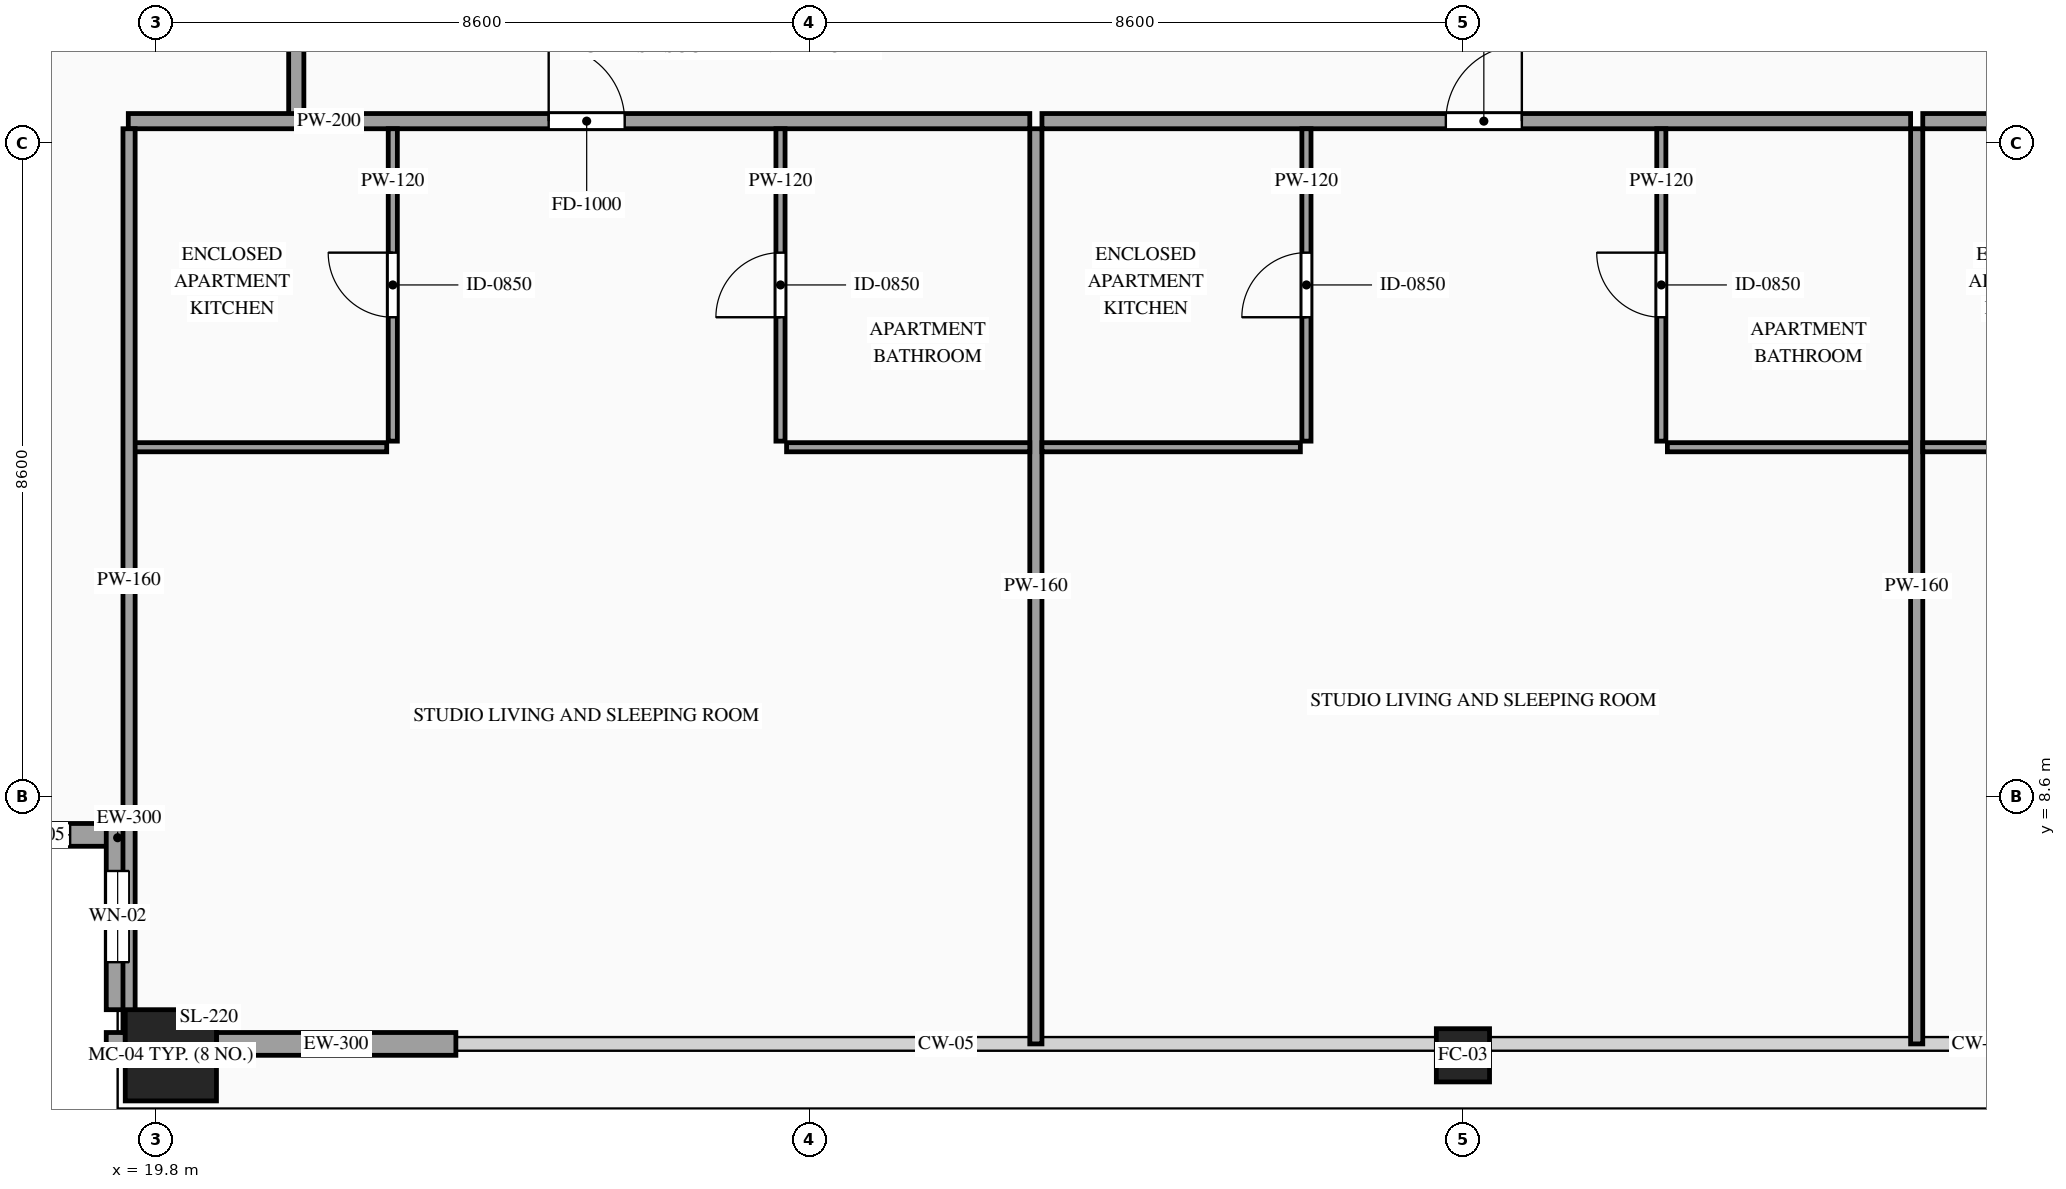
"""IFC4 building model, lengths in metres.
Left out: names, types, materials, properties, quantities, classifications, styles, units other than length and angle.
Written with IfcOpenShell. Run it as: python <this file> out.ifc"""

import sys

from ifc_helpers import new_model, si_unit, direction, frame, frame_2d, origin, origin_2d, place, context, subcontext, project, spatial, rectangle, hollow_rectangle, extrude, source, transform, mapped, element, fill, save


model = new_model("IFC4")
c1 = context("Model", 3, precision=1e-05, world=origin(), true_north=direction((0.0, 1.0)))
c2 = subcontext(c1, "Body", "Model", "MODEL_VIEW")
j1 = project(units=[si_unit("LENGTHUNIT", "METRE"), si_unit("PLANEANGLEUNIT", "RADIAN")], contexts=[c1])
p1 = place(None, origin())
s1 = spatial("IfcSite", under=j1, at=p1, CompositionType="ELEMENT")
p2 = place(p1, origin())
s2 = spatial("IfcBuilding", under=s1, at=p2, CompositionType="ELEMENT")
p3 = place(p2, frame((0.0, 0.0, 275.1)))
s3 = spatial("IfcBuildingStorey", under=s2, at=p3, CompositionType="ELEMENT", Elevation=275.1)
m1 = source(origin(), c2, "Body", "SweptSolid", [
    extrude(hollow_rectangle(XDim=1.2, YDim=1.2, WallThickness=0.055, at=origin_2d()), origin(), (0.0, 0.0, 1.0), 3.5),
])
p4 = place(p3, frame((20.0, 5.2, 0.0), z_axis=(0.0, 0.0, 1.0), x_axis=(1.0, 0.0, 0.0)))
e1 = element("IfcColumn", 1, at=p4, inside=s3, PredefinedType="COLUMN", context=c2, shape_type="MappedRepresentation", body=[
    mapped(m1, transform((0.0, 0.0, 0.0), scale=1.0)),
])
m2 = source(origin(), c2, "Body", "SweptSolid", [
    extrude(hollow_rectangle(XDim=0.7, YDim=0.7, WallThickness=0.032, at=origin_2d()), origin(), (0.0, 0.0, 1.0), 3.5),
])
p5 = place(p3, frame((37.0, 5.2, 0.0), z_axis=(0.0, 0.0, 1.0), x_axis=(1.0, 0.0, 0.0)))
e2 = element("IfcColumn", 2, at=p5, inside=s3, PredefinedType="COLUMN", context=c2, shape_type="MappedRepresentation", body=[
    mapped(m2, transform((0.0, 0.0, 0.0), scale=1.0)),
])
p6 = place(p3, frame((17.0, 8.1, 0.0), z_axis=(0.0, 0.0, 1.0), x_axis=(1.0, 0.0, 0.0)))
e3 = element("IfcWall", 3, at=p6, inside=s3, PredefinedType="SOLIDWALL", context=c2, shape_type="SweptSolid", body=[
    extrude(rectangle(XDim=2.45, YDim=0.3, at=frame_2d((1.225, 0.0))), origin(), (0.0, 0.0, 1.0), 3.28),
])
p7 = place(p6, frame((0.775, 0.0, 0.85)))
e4 = element("IfcOpeningElement", 4, at=p7, cuts=e3, PredefinedType="OPENING", context=c2, shape_type="SweptSolid", body=[
    extrude(rectangle(XDim=0.9, YDim=1.5, at=frame_2d((0.45, 0.75))), frame((0.0, 0.165, 0.0), z_axis=(0.0, -1.0, 0.0), x_axis=(1.0, 0.0, 0.0)), (0.0, 0.0, 1.0), 0.33),
])
p8 = place(p3, frame((19.3, 8.25, 0.0), z_axis=(0.0, 0.0, 1.0), x_axis=(0.0, -1.0, 0.0)))
e5 = element("IfcWall", 5, at=p8, inside=s3, PredefinedType="SOLIDWALL", context=c2, shape_type="SweptSolid", body=[
    extrude(rectangle(XDim=2.45, YDim=0.3, at=frame_2d((1.225, 0.0))), origin(), (0.0, 0.0, 1.0), 3.28),
])
p9 = place(p8, frame((0.625, 0.0, 0.85)))
e6 = element("IfcOpeningElement", 6, at=p9, cuts=e5, PredefinedType="OPENING", context=c2, shape_type="SweptSolid", body=[
    extrude(rectangle(XDim=1.2, YDim=2.1, at=frame_2d((0.6, 1.05))), frame((0.0, 0.165, 0.0), z_axis=(0.0, -1.0, 0.0), x_axis=(1.0, 0.0, 0.0)), (0.0, 0.0, 1.0), 0.33),
])
m3 = source(origin(), c2, "Body", "SweptSolid", [
    extrude(rectangle(XDim=0.25, YDim=0.3, at=frame_2d((0.125, 0.0))), origin(), (0.0, 0.0, 1.0), 3.28),
])
p10 = place(p3, frame((19.15, 5.35, 0.0), z_axis=(0.0, 0.0, 1.0), x_axis=(1.0, 0.0, 0.0)))
e7 = element("IfcWall", 7, at=p10, inside=s3, PredefinedType="SOLIDWALL", context=c2, shape_type="MappedRepresentation", body=[
    mapped(m3, transform((0.0, 0.0, 0.0), scale=1.0)),
])
m4 = source(origin(), c2, "Body", "SweptSolid", [
    extrude(rectangle(XDim=3.15, YDim=0.3, at=frame_2d((1.575, 0.0))), origin(), (0.0, 0.0, 1.0), 2.835),
])
p11 = place(p3, frame((20.6, 5.35, 0.0), z_axis=(0.0, 0.0, 1.0), x_axis=(1.0, 0.0, 0.0)))
e8 = element("IfcWall", 8, at=p11, inside=s3, PredefinedType="SOLIDWALL", context=c2, shape_type="MappedRepresentation", body=[
    mapped(m4, transform((0.0, 0.0, 0.0), scale=1.0)),
])
m5 = source(origin(), c2, "Body", "SweptSolid", [
    extrude(rectangle(XDim=1.7, YDim=0.2, at=frame_2d((0.85, 0.0))), origin(), (0.0, 0.0, 1.0), 3.28),
])
p12 = place(p3, frame((21.65, 17.55, 0.0), z_axis=(0.0, 0.0, 1.0), x_axis=(0.0, 1.0, 0.0)))
e9 = element("IfcWall", 9, at=p12, inside=s3, PredefinedType="PARTITIONING", context=c2, shape_type="MappedRepresentation", body=[
    mapped(m5, transform((0.0, 0.0, 0.0), scale=1.0)),
])
p13 = place(p3, frame((19.44, 17.49, 0.0), z_axis=(0.0, 0.0, 1.0), x_axis=(1.0, 0.0, 0.0)))
e10 = element("IfcWall", 10, at=p13, inside=s3, PredefinedType="PARTITIONING", context=c2, shape_type="SweptSolid", body=[
    extrude(rectangle(XDim=11.861, YDim=0.2, at=frame_2d((5.931, 0.0))), origin(), (0.0, 0.0, 1.0), 3.28),
])
p14 = place(p13, frame((5.531, 0.0, 0.0)))
e11 = element("IfcOpeningElement", 11, at=p14, cuts=e10, PredefinedType="OPENING", context=c2, shape_type="SweptSolid", body=[
    extrude(rectangle(XDim=1.0, YDim=2.2, at=frame_2d((0.5, 1.1))), frame((0.0, 0.115, 0.0), z_axis=(0.0, -1.0, 0.0), x_axis=(1.0, 0.0, 0.0)), (0.0, 0.0, 1.0), 0.23),
])
m6 = source(origin(), c2, "Body", "SweptSolid", [
    extrude(rectangle(XDim=12.04, YDim=0.16, at=frame_2d((6.02, 0.0))), origin(), (0.0, 0.0, 1.0), 3.28),
])
p15 = place(p3, frame((31.381, 5.35, 0.0), z_axis=(0.0, 0.0, 1.0), x_axis=(0.0, 1.0, 0.0)))
e12 = element("IfcWall", 12, at=p15, inside=s3, PredefinedType="PARTITIONING", context=c2, shape_type="MappedRepresentation", body=[
    mapped(m6, transform((0.0, 0.0, 0.0), scale=1.0)),
])
m7 = source(origin(), c2, "Body", "SweptSolid", [
    extrude(rectangle(XDim=3.4, YDim=0.12, at=frame_2d((1.7, 0.0))), origin(), (0.0, 0.0, 1.0), 3.28),
])
p16 = place(p3, frame((19.44, 13.2, 0.0), z_axis=(0.0, 0.0, 1.0), x_axis=(1.0, 0.0, 0.0)))
e13 = element("IfcWall", 13, at=p16, inside=s3, PredefinedType="PARTITIONING", context=c2, shape_type="MappedRepresentation", body=[
    mapped(m7, transform((0.0, 0.0, 0.0), scale=1.0)),
])
p17 = place(p3, frame((22.92, 13.28, 0.0), z_axis=(0.0, 0.0, 1.0), x_axis=(0.0, 1.0, 0.0)))
e14 = element("IfcWall", 14, at=p17, inside=s3, PredefinedType="PARTITIONING", context=c2, shape_type="SweptSolid", body=[
    extrude(rectangle(XDim=4.11, YDim=0.12, at=frame_2d((2.055, 0.0))), origin(), (0.0, 0.0, 1.0), 3.28),
])
p18 = place(p17, frame((1.63, 0.0, 0.0)))
e15 = element("IfcOpeningElement", 15, at=p18, cuts=e14, PredefinedType="OPENING", context=c2, shape_type="SweptSolid", body=[
    extrude(rectangle(XDim=0.85, YDim=2.1, at=frame_2d((0.425, 1.05))), frame((0.0, 0.075, 0.0), z_axis=(0.0, -1.0, 0.0), x_axis=(1.0, 0.0, 0.0)), (0.0, 0.0, 1.0), 0.15),
])
m8 = source(origin(), c2, "Body", "SweptSolid", [
    extrude(rectangle(XDim=3.2, YDim=0.12, at=frame_2d((1.6, 0.0))), origin(), (0.0, 0.0, 1.0), 3.28),
])
p19 = place(p3, frame((28.101, 13.2, 0.0), z_axis=(0.0, 0.0, 1.0), x_axis=(1.0, 0.0, 0.0)))
e16 = element("IfcWall", 16, at=p19, inside=s3, PredefinedType="PARTITIONING", context=c2, shape_type="MappedRepresentation", body=[
    mapped(m8, transform((0.0, 0.0, 0.0), scale=1.0)),
])
p20 = place(p3, frame((28.021, 13.28, 0.0), z_axis=(0.0, 0.0, 1.0), x_axis=(0.0, 1.0, 0.0)))
e17 = element("IfcWall", 17, at=p20, inside=s3, PredefinedType="PARTITIONING", context=c2, shape_type="SweptSolid", body=[
    extrude(rectangle(XDim=4.11, YDim=0.12, at=frame_2d((2.055, 0.0))), origin(), (0.0, 0.0, 1.0), 3.28),
])
p21 = place(p20, frame((1.63, 0.0, 0.0)))
e18 = element("IfcOpeningElement", 18, at=p21, cuts=e17, PredefinedType="OPENING", context=c2, shape_type="SweptSolid", body=[
    extrude(rectangle(XDim=0.85, YDim=2.1, at=frame_2d((0.425, 1.05))), frame((0.0, 0.075, 0.0), z_axis=(0.0, -1.0, 0.0), x_axis=(1.0, 0.0, 0.0)), (0.0, 0.0, 1.0), 0.15),
])
p22 = place(p3, frame((31.461, 17.49, 0.0), z_axis=(0.0, 0.0, 1.0), x_axis=(1.0, 0.0, 0.0)))
e19 = element("IfcWall", 19, at=p22, inside=s3, PredefinedType="PARTITIONING", context=c2, shape_type="SweptSolid", body=[
    extrude(rectangle(XDim=11.429, YDim=0.2, at=frame_2d((5.714, 0.0))), origin(), (0.0, 0.0, 1.0), 3.28),
])
p23 = place(p22, frame((5.314, 0.0, 0.0)))
e20 = element("IfcOpeningElement", 20, at=p23, cuts=e19, PredefinedType="OPENING", context=c2, shape_type="SweptSolid", body=[
    extrude(rectangle(XDim=1.0, YDim=2.2, at=frame_2d((0.5, 1.1))), frame((0.0, 0.115, 0.0), z_axis=(0.0, -1.0, 0.0), x_axis=(1.0, 0.0, 0.0)), (0.0, 0.0, 1.0), 0.23),
])
p24 = place(p3, frame((42.97, 5.35, 0.0), z_axis=(0.0, 0.0, 1.0), x_axis=(0.0, 1.0, 0.0)))
e21 = element("IfcWall", 21, at=p24, inside=s3, PredefinedType="PARTITIONING", context=c2, shape_type="MappedRepresentation", body=[
    mapped(m6, transform((0.0, 0.0, 0.0), scale=1.0)),
])
p25 = place(p3, frame((31.461, 13.2, 0.0), z_axis=(0.0, 0.0, 1.0), x_axis=(1.0, 0.0, 0.0)))
e22 = element("IfcWall", 22, at=p25, inside=s3, PredefinedType="PARTITIONING", context=c2, shape_type="MappedRepresentation", body=[
    mapped(m7, transform((0.0, 0.0, 0.0), scale=1.0)),
])
p26 = place(p3, frame((34.941, 13.28, 0.0), z_axis=(0.0, 0.0, 1.0), x_axis=(0.0, 1.0, 0.0)))
e23 = element("IfcWall", 23, at=p26, inside=s3, PredefinedType="PARTITIONING", context=c2, shape_type="SweptSolid", body=[
    extrude(rectangle(XDim=4.11, YDim=0.12, at=frame_2d((2.055, 0.0))), origin(), (0.0, 0.0, 1.0), 3.28),
])
p27 = place(p26, frame((1.63, 0.0, 0.0)))
e24 = element("IfcOpeningElement", 24, at=p27, cuts=e23, PredefinedType="OPENING", context=c2, shape_type="SweptSolid", body=[
    extrude(rectangle(XDim=0.85, YDim=2.1, at=frame_2d((0.425, 1.05))), frame((0.0, 0.075, 0.0), z_axis=(0.0, -1.0, 0.0), x_axis=(1.0, 0.0, 0.0)), (0.0, 0.0, 1.0), 0.15),
])
p28 = place(p3, frame((39.69, 13.2, 0.0), z_axis=(0.0, 0.0, 1.0), x_axis=(1.0, 0.0, 0.0)))
e25 = element("IfcWall", 25, at=p28, inside=s3, PredefinedType="PARTITIONING", context=c2, shape_type="MappedRepresentation", body=[
    mapped(m8, transform((0.0, 0.0, 0.0), scale=1.0)),
])
p29 = place(p3, frame((39.61, 13.28, 0.0), z_axis=(0.0, 0.0, 1.0), x_axis=(0.0, 1.0, 0.0)))
e26 = element("IfcWall", 26, at=p29, inside=s3, PredefinedType="PARTITIONING", context=c2, shape_type="SweptSolid", body=[
    extrude(rectangle(XDim=4.11, YDim=0.12, at=frame_2d((2.055, 0.0))), origin(), (0.0, 0.0, 1.0), 3.28),
])
p30 = place(p29, frame((1.63, 0.0, 0.0)))
e27 = element("IfcOpeningElement", 27, at=p30, cuts=e26, PredefinedType="OPENING", context=c2, shape_type="SweptSolid", body=[
    extrude(rectangle(XDim=0.85, YDim=2.1, at=frame_2d((0.425, 1.05))), frame((0.0, 0.075, 0.0), z_axis=(0.0, -1.0, 0.0), x_axis=(1.0, 0.0, 0.0)), (0.0, 0.0, 1.0), 0.15),
])
p31 = place(p3, frame((43.05, 17.49, 0.0), z_axis=(0.0, 0.0, 1.0), x_axis=(1.0, 0.0, 0.0)))
e28 = element("IfcWall", 28, at=p31, inside=s3, PredefinedType="PARTITIONING", context=c2, shape_type="SweptSolid", body=[
    extrude(rectangle(XDim=11.51, YDim=0.2, at=frame_2d((5.755, 0.0))), origin(), (0.0, 0.0, 1.0), 3.28),
])
p32 = place(p31, frame((5.355, 0.0, 0.0)))
e29 = element("IfcOpeningElement", 29, at=p32, cuts=e28, PredefinedType="OPENING", context=c2, shape_type="SweptSolid", body=[
    extrude(rectangle(XDim=1.0, YDim=2.2, at=frame_2d((0.5, 1.1))), frame((0.0, 0.115, 0.0), z_axis=(0.0, -1.0, 0.0), x_axis=(1.0, 0.0, 0.0)), (0.0, 0.0, 1.0), 0.23),
])
m9 = source(origin(), c2, "Body", "SweptSolid", [
    extrude(rectangle(XDim=11.89, YDim=0.16, at=frame_2d((5.945, 0.0))), origin(), (0.0, 0.0, 1.0), 3.28),
])
p33 = place(p3, frame((19.45, 5.5, 0.0), z_axis=(0.0, 0.0, 1.0), x_axis=(0.0, 1.0, 0.0)))
e30 = element("IfcWall", 30, at=p33, inside=s3, PredefinedType="PARTITIONING", context=c2, shape_type="MappedRepresentation", body=[
    mapped(m9, transform((0.0, 0.0, 0.0), scale=1.0)),
])
m10 = source(origin(), c2, "Body", "SweptSolid", [
    extrude(rectangle(XDim=3.4, YDim=0.12, at=frame_2d((1.7, 0.0))), origin(), (0.0, 0.0, 1.0), 3.28),
])
p34 = place(p3, frame((43.05, 13.2, 0.0), z_axis=(0.0, 0.0, 1.0), x_axis=(1.0, 0.0, 0.0)))
e31 = element("IfcWall", 31, at=p34, inside=s3, PredefinedType="PARTITIONING", context=c2, shape_type="MappedRepresentation", body=[
    mapped(m10, transform((0.0, 0.0, 0.0), scale=1.0)),
])
m11 = source(origin(), c2, "Body", "SweptSolid", [
    extrude(rectangle(XDim=0.9, YDim=1.5, at=frame_2d((0.45, 0.75))), frame((0.0, 0.03, 0.0), z_axis=(0.0, -1.0, 0.0), x_axis=(1.0, 0.0, 0.0)), (0.0, 0.0, 1.0), 0.06),
])
p35 = place(p7, origin())
e32 = element("IfcWindow", 32, at=p35, inside=s3, PartitioningType="SINGLE_PANEL", PredefinedType="WINDOW", context=c2, shape_type="MappedRepresentation", body=[
    mapped(m11, transform((0.0, 0.0, 0.0), scale=1.0)),
])
fill(e4, e32)
m12 = source(origin(), c2, "Body", "SweptSolid", [
    extrude(rectangle(XDim=1.2, YDim=2.1, at=frame_2d((0.6, 1.05))), frame((0.0, 0.03, 0.0), z_axis=(0.0, -1.0, 0.0), x_axis=(1.0, 0.0, 0.0)), (0.0, 0.0, 1.0), 0.06),
])
p36 = place(p9, origin())
e33 = element("IfcWindow", 33, at=p36, inside=s3, PartitioningType="SINGLE_PANEL", PredefinedType="WINDOW", context=c2, shape_type="MappedRepresentation", body=[
    mapped(m12, transform((0.0, 0.0, 0.0), scale=1.0)),
])
fill(e6, e33)
m13 = source(origin(), c2, "Body", "SweptSolid", [
    extrude(rectangle(XDim=1.0, YDim=2.2, at=frame_2d((0.5, 1.1))), frame((0.0, 0.025, 0.0), z_axis=(0.0, -1.0, 0.0), x_axis=(1.0, 0.0, 0.0)), (0.0, 0.0, 1.0), 0.05),
])
p37 = place(p14, origin())
e34 = element("IfcDoor", 34, at=p37, inside=s3, OperationType="SINGLE_SWING_LEFT", PredefinedType="DOOR", context=c2, shape_type="MappedRepresentation", body=[
    mapped(m13, transform((0.0, 0.0, 0.0), scale=1.0)),
])
fill(e11, e34)
m14 = source(origin(), c2, "Body", "SweptSolid", [
    extrude(rectangle(XDim=0.85, YDim=2.1, at=frame_2d((0.425, 1.05))), frame((0.0, 0.025, 0.0), z_axis=(0.0, -1.0, 0.0), x_axis=(1.0, 0.0, 0.0)), (0.0, 0.0, 1.0), 0.05),
])
p38 = place(p18, origin())
e35 = element("IfcDoor", 35, at=p38, inside=s3, OperationType="SINGLE_SWING_RIGHT", PredefinedType="DOOR", context=c2, shape_type="MappedRepresentation", body=[
    mapped(m14, transform((0.0, 0.0, 0.0), scale=1.0)),
])
fill(e15, e35)
p39 = place(p21, origin())
e36 = element("IfcDoor", 36, at=p39, inside=s3, OperationType="SINGLE_SWING_LEFT", PredefinedType="DOOR", context=c2, shape_type="MappedRepresentation", body=[
    mapped(m14, transform((0.0, 0.0, 0.0), scale=1.0)),
])
fill(e18, e36)
p40 = place(p23, origin())
e37 = element("IfcDoor", 37, at=p40, inside=s3, OperationType="SINGLE_SWING_RIGHT", PredefinedType="DOOR", context=c2, shape_type="MappedRepresentation", body=[
    mapped(m13, transform((0.0, 0.0, 0.0), scale=1.0)),
])
fill(e20, e37)
p41 = place(p27, origin())
e38 = element("IfcDoor", 38, at=p41, inside=s3, OperationType="SINGLE_SWING_LEFT", PredefinedType="DOOR", context=c2, shape_type="MappedRepresentation", body=[
    mapped(m14, transform((0.0, 0.0, 0.0), scale=1.0)),
])
fill(e24, e38)
p42 = place(p30, origin())
e39 = element("IfcDoor", 39, at=p42, inside=s3, OperationType="SINGLE_SWING_RIGHT", PredefinedType="DOOR", context=c2, shape_type="MappedRepresentation", body=[
    mapped(m14, transform((0.0, 0.0, 0.0), scale=1.0)),
])
fill(e27, e39)
save(model, sys.argv[1])
